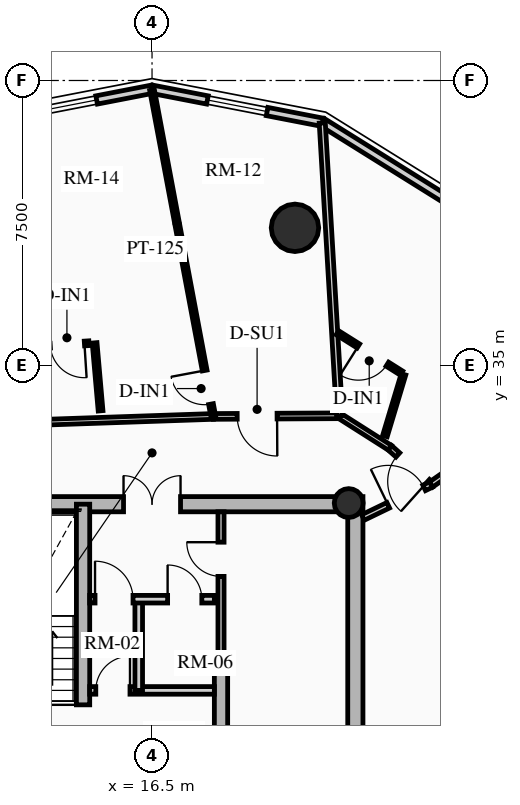
"""IFC4 building model, lengths in metres.
Left out: names, types, materials, properties, quantities, classifications, styles, units other than length and angle.
Written with IfcOpenShell. Run it as: python <this file> out.ifc"""

import sys

from ifc_helpers import new_model, si_unit, direction, frame, frame_2d, origin, origin_2d, place, context, subcontext, project, spatial, rectangle, circle, hollow_circle, extrude, source, transform, mapped, element, fill, save


model = new_model("IFC4")
c1 = context("Model", 3, precision=1e-05, world=origin(), true_north=direction((0.0, 1.0)))
c2 = subcontext(c1, "Body", "Model", "MODEL_VIEW")
j1 = project(units=[si_unit("LENGTHUNIT", "METRE"), si_unit("PLANEANGLEUNIT", "RADIAN")], contexts=[c1])
p1 = place(None, origin())
s1 = spatial("IfcSite", under=j1, at=p1, CompositionType="ELEMENT")
p2 = place(p1, origin())
s2 = spatial("IfcBuilding", under=s1, at=p2, CompositionType="ELEMENT")
p3 = place(p2, frame((0.0, 0.0, 157.42)))
s3 = spatial("IfcBuildingStorey", under=s2, at=p3, CompositionType="ELEMENT", Elevation=157.42)
p4 = place(p3, frame((21.85, 17.45, 0.0), z_axis=(0.0, 0.0, 1.0), x_axis=(0.0, 1.0, 0.0)))
e1 = element("IfcWall", 1, at=p4, inside=s3, PredefinedType="SHEAR", context=c2, shape_type="SweptSolid", body=[
    extrude(rectangle(XDim=14.1, YDim=0.4, at=frame_2d((7.05, 0.0))), origin(), (0.0, 0.0, 1.0), 2.91),
])
p5 = place(p3, frame((11.15, 31.35, 0.0), z_axis=(0.0, 0.0, 1.0), x_axis=(1.0, 0.0, 0.0)))
e2 = element("IfcWall", 2, at=p5, inside=s3, PredefinedType="SHEAR", context=c2, shape_type="SweptSolid", body=[
    extrude(rectangle(XDim=10.7, YDim=0.4, at=frame_2d((5.35, 0.0))), origin(), (0.0, 0.0, 1.0), 2.91),
])
m1 = source(origin(), c2, "Body", "SweptSolid", [
    extrude(rectangle(XDim=1.5, YDim=2.02, at=frame_2d((0.75, 1.01))), frame((0.0, 0.21, 0.0), z_axis=(0.0, -1.0, 0.0), x_axis=(1.0, 0.0, 0.0)), (0.0, 0.0, 1.0), 0.42),
])
p6 = place(p5, frame((4.6, 0.0, 0.0)))
e3 = element("IfcOpeningElement", 3, at=p6, cuts=e2, PredefinedType="OPENING", context=c2, shape_type="MappedRepresentation", body=[
    mapped(m1, transform((0.0, 0.0, 0.0), x_axis=(1.0, 0.0, 0.0), y_axis=(0.0, 1.0, 0.0), z_axis=(0.0, 0.0, 1.0), scale=1.0)),
])
p7 = place(p3, frame((14.685, 17.65, 0.0), z_axis=(0.0, 0.0, 1.0), x_axis=(0.0, 1.0, 0.0)))
e4 = element("IfcWall", 4, at=p7, inside=s3, PredefinedType="SHEAR", context=c2, shape_type="SweptSolid", body=[
    extrude(rectangle(XDim=13.7, YDim=0.35, at=frame_2d((6.85, 0.0))), origin(), (0.0, 0.0, 1.0), 2.91),
])
m2 = source(origin(), c2, "Body", "SweptSolid", [
    extrude(rectangle(XDim=1.1, YDim=2.015, at=frame_2d((0.55, 1.007))), frame((0.0, 0.185, 0.0), z_axis=(0.0, -1.0, 0.0), x_axis=(1.0, 0.0, 0.0)), (0.0, 0.0, 1.0), 0.37),
])
p8 = place(p7, frame((4.85, 0.0, 0.0)))
e5 = element("IfcOpeningElement", 5, at=p8, cuts=e4, PredefinedType="OPENING", context=c2, shape_type="MappedRepresentation", body=[
    mapped(m2, transform((0.0, 0.0, 0.0), x_axis=(1.0, 0.0, 0.0), y_axis=(0.0, 1.0, 0.0), z_axis=(0.0, 0.0, 1.0), scale=1.0)),
])
p9 = place(p7, frame((0.625, 0.0, 0.0)))
e6 = element("IfcOpeningElement", 6, at=p9, cuts=e4, PredefinedType="OPENING", context=c2, shape_type="MappedRepresentation", body=[
    mapped(m2, transform((0.0, 0.0, 0.0), x_axis=(1.0, 0.0, 0.0), y_axis=(0.0, 1.0, 0.0), z_axis=(0.0, 0.0, 1.0), scale=1.0)),
])
p10 = place(p7, frame((2.625, 0.0, 0.0)))
e7 = element("IfcOpeningElement", 7, at=p10, cuts=e4, PredefinedType="OPENING", context=c2, shape_type="MappedRepresentation", body=[
    mapped(m2, transform((0.0, 0.0, 0.0), x_axis=(1.0, 0.0, 0.0), y_axis=(0.0, 1.0, 0.0), z_axis=(0.0, 0.0, 1.0), scale=1.0)),
])
m3 = source(origin(), c2, "Body", "SweptSolid", [
    extrude(rectangle(XDim=1.15, YDim=2.02, at=frame_2d((0.575, 1.01))), frame((0.0, 0.185, 0.0), z_axis=(0.0, -1.0, 0.0), x_axis=(1.0, 0.0, 0.0)), (0.0, 0.0, 1.0), 0.37),
])
p11 = place(p7, frame((7.27, 0.0, 0.0)))
e8 = element("IfcOpeningElement", 8, at=p11, cuts=e4, PredefinedType="OPENING", context=c2, shape_type="MappedRepresentation", body=[
    mapped(m3, transform((0.0, 0.0, 0.0), x_axis=(1.0, 0.0, 0.0), y_axis=(0.0, 1.0, 0.0), z_axis=(0.0, 0.0, 1.0), scale=1.0)),
])
p12 = place(p3, frame((18.315, 17.65, 0.0), z_axis=(0.0, 0.0, 1.0), x_axis=(0.0, 1.0, 0.0)))
e9 = element("IfcWall", 9, at=p12, inside=s3, PredefinedType="SHEAR", context=c2, shape_type="SweptSolid", body=[
    extrude(rectangle(XDim=9.6, YDim=0.35, at=frame_2d((4.8, 0.0))), origin(), (0.0, 0.0, 1.0), 2.91),
])
p13 = place(p12, frame((5.28, 0.0, 0.0)))
e10 = element("IfcOpeningElement", 10, at=p13, cuts=e9, PredefinedType="OPENING", context=c2, shape_type="MappedRepresentation", body=[
    mapped(m3, transform((0.0, 0.0, 0.0), x_axis=(1.0, 0.0, 0.0), y_axis=(0.0, 1.0, 0.0), z_axis=(0.0, 0.0, 1.0), scale=1.0)),
])
p14 = place(p3, frame((21.675, 31.38, 0.0), z_axis=(0.0, 0.0, 1.0), x_axis=(1.0, 0.0, 0.0)))
e11 = element("IfcColumn", 11, at=p14, inside=s3, PredefinedType="COLUMN", context=c2, shape_type="SweptSolid", body=[
    extrude(hollow_circle(Radius=0.38, WallThickness=0.032, at=origin_2d()), origin(), (0.0, 0.0, 1.0), 2.91),
])
p15 = place(p3, frame((20.261, 38.623, 0.0), z_axis=(0.0, 0.0, 1.0), x_axis=(1.0, 0.0, 0.0)))
e12 = element("IfcColumn", 12, at=p15, inside=s3, PredefinedType="USERDEFINED", context=c2, shape_type="SweptSolid", body=[
    extrude(circle(Radius=0.625, at=origin_2d()), origin(), (0.0, 0.0, 1.0), 2.91),
])
p16 = place(p3, frame((20.985, 41.4, 0.0), z_axis=(0.0, 0.0, 1.0), x_axis=(0.848452391194, -0.529271707044, 0.0)))
e13 = element("IfcWall", 13, at=p16, inside=s3, PredefinedType="SOLIDWALL", context=c2, shape_type="SweptSolid", body=[
    extrude(rectangle(XDim=4.769, YDim=0.22, at=frame_2d((2.385, 0.0))), origin(), (0.0, 0.0, 1.0), 2.245),
])
p17 = place(p3, frame((16.5, 42.27, 0.0), z_axis=(0.0, 0.0, 1.0), x_axis=(0.981718699963, -0.190337579429, 0.0)))
e14 = element("IfcWall", 14, at=p17, inside=s3, PredefinedType="SOLIDWALL", context=c2, shape_type="SweptSolid", body=[
    extrude(rectangle(XDim=4.569, YDim=0.22, at=frame_2d((2.284, 0.0))), origin(), (0.0, 0.0, 1.0), 2.245),
])
m4 = source(origin(), c2, "Body", "SweptSolid", [
    extrude(rectangle(XDim=1.6, YDim=1.3, at=frame_2d((0.8, 0.65))), frame((0.0, 0.12, 0.0), z_axis=(0.0, -1.0, 0.0), x_axis=(1.0, 0.0, 0.0)), (0.0, 0.0, 1.0), 0.24),
])
p18 = place(p17, frame((1.484, 0.0, 0.65)))
e15 = element("IfcOpeningElement", 15, at=p18, cuts=e14, PredefinedType="OPENING", context=c2, shape_type="MappedRepresentation", body=[
    mapped(m4, transform((0.0, 0.0, 0.0), x_axis=(1.0, 0.0, 0.0), y_axis=(0.0, 1.0, 0.0), z_axis=(0.0, 0.0, 1.0), scale=1.0)),
])
p19 = place(p3, frame((12.015, 41.4, 0.0), z_axis=(0.0, 0.0, 1.0), x_axis=(0.981718699963, 0.190337579429, 0.0)))
e16 = element("IfcWall", 16, at=p19, inside=s3, PredefinedType="SOLIDWALL", context=c2, shape_type="SweptSolid", body=[
    extrude(rectangle(XDim=4.569, YDim=0.22, at=frame_2d((2.284, 0.0))), origin(), (0.0, 0.0, 1.0), 2.245),
])
p20 = place(p19, frame((1.484, 0.0, 0.65)))
e17 = element("IfcOpeningElement", 17, at=p20, cuts=e16, PredefinedType="OPENING", context=c2, shape_type="MappedRepresentation", body=[
    mapped(m4, transform((0.0, 0.0, 0.0), x_axis=(1.0, 0.0, 0.0), y_axis=(0.0, 1.0, 0.0), z_axis=(0.0, 0.0, 1.0), scale=1.0)),
])
p21 = place(p3, frame((14.86, 26.45, 0.0), z_axis=(0.0, 0.0, 1.0), x_axis=(1.0, 0.0, 0.0)))
e18 = element("IfcWall", 18, at=p21, inside=s3, PredefinedType="PARTITIONING", context=c2, shape_type="SweptSolid", body=[
    extrude(rectangle(XDim=3.28, YDim=0.2, at=frame_2d((1.64, 0.0))), origin(), (0.0, 0.0, 1.0), 2.675),
])
m5 = source(origin(), c2, "Body", "SweptSolid", [
    extrude(rectangle(XDim=0.9, YDim=2.005, at=frame_2d((0.45, 1.002))), frame((0.0, 0.11, 0.0), z_axis=(0.0, -1.0, 0.0), x_axis=(1.0, 0.0, 0.0)), (0.0, 0.0, 1.0), 0.22),
])
p22 = place(p21, frame((0.16, 0.0, 0.0)))
e19 = element("IfcOpeningElement", 19, at=p22, cuts=e18, PredefinedType="OPENING", context=c2, shape_type="MappedRepresentation", body=[
    mapped(m5, transform((0.0, 0.0, 0.0), x_axis=(1.0, 0.0, 0.0), y_axis=(0.0, 1.0, 0.0), z_axis=(0.0, 0.0, 1.0), scale=1.0)),
])
p23 = place(p3, frame((16.15, 26.45, 0.0), z_axis=(0.0, 0.0, 1.0), x_axis=(0.0, 1.0, 0.0)))
e20 = element("IfcWall", 20, at=p23, inside=s3, PredefinedType="PARTITIONING", context=c2, shape_type="SweptSolid", body=[
    extrude(rectangle(XDim=2.4, YDim=0.2, at=frame_2d((1.2, 0.0))), origin(), (0.0, 0.0, 1.0), 2.675),
])
p24 = place(p3, frame((14.86, 28.85, 0.0), z_axis=(0.0, 0.0, 1.0), x_axis=(1.0, 0.0, 0.0)))
e21 = element("IfcWall", 21, at=p24, inside=s3, PredefinedType="PARTITIONING", context=c2, shape_type="SweptSolid", body=[
    extrude(rectangle(XDim=3.28, YDim=0.2, at=frame_2d((1.64, 0.0))), origin(), (0.0, 0.0, 1.0), 2.675),
])
m6 = source(origin(), c2, "Body", "SweptSolid", [
    extrude(rectangle(XDim=1.0, YDim=2.015, at=frame_2d((0.5, 1.007))), frame((0.0, 0.11, 0.0), z_axis=(0.0, -1.0, 0.0), x_axis=(1.0, 0.0, 0.0)), (0.0, 0.0, 1.0), 0.22),
])
p25 = place(p24, frame((0.14, 0.0, 0.0)))
e22 = element("IfcOpeningElement", 22, at=p25, cuts=e21, PredefinedType="OPENING", context=c2, shape_type="MappedRepresentation", body=[
    mapped(m6, transform((0.0, 0.0, 0.0), x_axis=(1.0, 0.0, 0.0), y_axis=(0.0, 1.0, 0.0), z_axis=(0.0, 0.0, 1.0), scale=1.0)),
])
p26 = place(p24, frame((2.05, 0.0, 0.0)))
e23 = element("IfcOpeningElement", 23, at=p26, cuts=e21, PredefinedType="OPENING", context=c2, shape_type="MappedRepresentation", body=[
    mapped(m5, transform((0.0, 0.0, 0.0), x_axis=(1.0, 0.0, 0.0), y_axis=(0.0, 1.0, 0.0), z_axis=(0.0, 0.0, 1.0), scale=1.0)),
])
p27 = place(p3, frame((18.315, 27.25, 0.0), z_axis=(0.0, 0.0, 1.0), x_axis=(0.0, 1.0, 0.0)))
e24 = element("IfcWall", 24, at=p27, inside=s3, PredefinedType="PARTITIONING", context=c2, shape_type="SweptSolid", body=[
    extrude(rectangle(XDim=3.9, YDim=0.16, at=frame_2d((1.95, 0.0))), origin(), (0.0, 0.0, 1.0), 2.675),
])
m7 = source(origin(), c2, "Body", "SweptSolid", [
    extrude(rectangle(XDim=0.9, YDim=2.005, at=frame_2d((0.45, 1.002))), frame((0.0, 0.09, 0.0), z_axis=(0.0, -1.0, 0.0), x_axis=(1.0, 0.0, 0.0)), (0.0, 0.0, 1.0), 0.18),
])
p28 = place(p27, frame((2.2, 0.0, 0.0)))
e25 = element("IfcOpeningElement", 25, at=p28, cuts=e24, PredefinedType="OPENING", context=c2, shape_type="MappedRepresentation", body=[
    mapped(m7, transform((0.0, 0.0, 0.0), x_axis=(1.0, 0.0, 0.0), y_axis=(0.0, 1.0, 0.0), z_axis=(0.0, 0.0, 1.0), scale=1.0)),
])
p29 = place(p3, frame((23.841, 31.866, 0.0), z_axis=(0.0, 0.0, 1.0), x_axis=(-0.74511843306, 0.666932171, 0.0)))
e26 = element("IfcWall", 26, at=p29, inside=s3, PredefinedType="PARTITIONING", context=c2, shape_type="SweptSolid", body=[
    extrude(rectangle(XDim=1.455, YDim=0.15, at=frame_2d((0.728, 0.0))), origin(), (0.0, 0.0, 1.0), 2.245),
])
m8 = source(origin(), c2, "Body", "SweptSolid", [
    extrude(rectangle(XDim=1.05, YDim=2.015, at=frame_2d((0.525, 1.007))), frame((0.0, 0.085, 0.0), z_axis=(0.0, -1.0, 0.0), x_axis=(1.0, 0.0, 0.0)), (0.0, 0.0, 1.0), 0.17),
])
p30 = place(p29, frame((0.12, 0.0, 0.0)))
e27 = element("IfcOpeningElement", 27, at=p30, cuts=e26, PredefinedType="OPENING", context=c2, shape_type="MappedRepresentation", body=[
    mapped(m8, transform((0.0, 0.0, 0.0), x_axis=(1.0, 0.0, 0.0), y_axis=(0.0, 1.0, 0.0), z_axis=(0.0, 0.0, 1.0), scale=1.0)),
])
p31 = place(p3, frame((22.756, 32.836, 0.0), z_axis=(0.0, 0.0, 1.0), x_axis=(-0.843828401801, 0.536613108593, 0.0)))
e28 = element("IfcWall", 28, at=p31, inside=s3, PredefinedType="PARTITIONING", context=c2, shape_type="SweptSolid", body=[
    extrude(rectangle(XDim=1.565, YDim=0.15, at=frame_2d((0.783, 0.0))), origin(), (0.0, 0.0, 1.0), 2.245),
])
p32 = place(p3, frame((21.435, 33.677, 0.0), z_axis=(0.0, 0.0, 1.0), x_axis=(-0.999986775557, -0.005142831114, 0.0)))
e29 = element("IfcWall", 29, at=p32, inside=s3, PredefinedType="PARTITIONING", context=c2, shape_type="SweptSolid", body=[
    extrude(rectangle(XDim=3.323, YDim=0.15, at=frame_2d((1.662, 0.0))), origin(), (0.0, 0.0, 1.0), 2.245),
])
p33 = place(p32, frame((1.645, 0.0, 0.0)))
e30 = element("IfcOpeningElement", 30, at=p33, cuts=e29, PredefinedType="OPENING", context=c2, shape_type="MappedRepresentation", body=[
    mapped(m8, transform((0.0, 0.0, 0.0), x_axis=(1.0, 0.0, 0.0), y_axis=(0.0, 1.0, 0.0), z_axis=(0.0, 0.0, 1.0), scale=1.0)),
])
p34 = place(p3, frame((18.112, 33.659, 0.0), z_axis=(0.0, 0.0, 1.0), x_axis=(-0.999413895918, -0.034232508622, 0.0)))
e31 = element("IfcWall", 31, at=p34, inside=s3, PredefinedType="PARTITIONING", context=c2, shape_type="SweptSolid", body=[
    extrude(rectangle(XDim=6.404, YDim=0.15, at=frame_2d((3.202, 0.0))), origin(), (0.0, 0.0, 1.0), 2.245),
])
p35 = place(p3, frame((23.841, 31.866, 0.0), z_axis=(0.0, 0.0, 1.0), x_axis=(0.819514693563, 0.573058170724, 0.0)))
e32 = element("IfcWall", 32, at=p35, inside=s3, PredefinedType="PARTITIONING", context=c2, shape_type="SweptSolid", body=[
    extrude(rectangle(XDim=5.352, YDim=0.16, at=frame_2d((2.676, 0.0))), origin(), (0.0, 0.0, 1.0), 2.245),
])
p36 = place(p3, frame((21.435, 33.677, 0.0), z_axis=(0.0, 0.0, 1.0), x_axis=(-0.059087305226, 0.99825281886, 0.0)))
e33 = element("IfcWall", 33, at=p36, inside=s3, PredefinedType="PARTITIONING", context=c2, shape_type="SweptSolid", body=[
    extrude(rectangle(XDim=7.718, YDim=0.16, at=frame_2d((3.859, 0.0))), origin(), (0.0, 0.0, 1.0), 2.245),
])
p37 = place(p3, frame((22.05, 31.0, 0.0), z_axis=(0.0, 0.0, 1.0), x_axis=(0.900241516545, 0.435390872537, 0.0)))
e34 = element("IfcWall", 34, at=p37, inside=s3, PredefinedType="PARTITIONING", context=c2, shape_type="SweptSolid", body=[
    extrude(rectangle(XDim=1.989, YDim=0.16, at=frame_2d((0.995, 0.0))), origin(), (0.0, 0.0, 1.0), 2.245),
])
m9 = source(origin(), c2, "Body", "SweptSolid", [
    extrude(rectangle(XDim=1.05, YDim=2.015, at=frame_2d((0.525, 1.007))), frame((0.0, 0.09, 0.0), z_axis=(0.0, -1.0, 0.0), x_axis=(1.0, 0.0, 0.0)), (0.0, 0.0, 1.0), 0.18),
])
p38 = place(p37, frame((0.739, 0.0, 0.0)))
e35 = element("IfcOpeningElement", 35, at=p38, cuts=e34, PredefinedType="OPENING", context=c2, shape_type="MappedRepresentation", body=[
    mapped(m9, transform((0.0, 0.0, 0.0), x_axis=(1.0, 0.0, 0.0), y_axis=(0.0, 1.0, 0.0), z_axis=(0.0, 0.0, 1.0), scale=1.0)),
])
p39 = place(p3, frame((22.628, 33.142, 0.0), z_axis=(0.0, 0.0, 1.0), x_axis=(0.28808673097, 0.957604320917, 0.0)))
e36 = element("IfcWall", 36, at=p39, inside=s3, PredefinedType="PARTITIONING", context=c2, shape_type="SweptSolid", body=[
    extrude(rectangle(XDim=1.698, YDim=0.125, at=frame_2d((0.849, 0.0))), origin(), (0.0, 0.0, 1.0), 2.245),
])
p40 = place(p3, frame((23.064, 34.801, 0.0), z_axis=(0.0, 0.0, 1.0), x_axis=(-0.846418905871, 0.532517638942, 0.0)))
e37 = element("IfcWall", 37, at=p40, inside=s3, PredefinedType="PARTITIONING", context=c2, shape_type="SweptSolid", body=[
    extrude(rectangle(XDim=1.993, YDim=0.125, at=frame_2d((0.997, 0.0))), origin(), (0.0, 0.0, 1.0), 2.675),
])
m10 = source(origin(), c2, "Body", "SweptSolid", [
    extrude(rectangle(XDim=0.9, YDim=2.005, at=frame_2d((0.45, 1.002))), frame((0.0, 0.073, 0.0), z_axis=(0.0, -1.0, 0.0), x_axis=(1.0, 0.0, 0.0)), (0.0, 0.0, 1.0), 0.145),
])
p41 = place(p40, frame((0.44, 0.0, 0.0)))
e38 = element("IfcOpeningElement", 38, at=p41, cuts=e37, PredefinedType="OPENING", context=c2, shape_type="MappedRepresentation", body=[
    mapped(m10, transform((0.0, 0.0, 0.0), x_axis=(1.0, 0.0, 0.0), y_axis=(0.0, 1.0, 0.0), z_axis=(0.0, 0.0, 1.0), scale=1.0)),
])
p42 = place(p3, frame((18.112, 33.659, 0.0), z_axis=(0.0, 0.0, 1.0), x_axis=(-0.18446223694, 0.982839601941, 0.0)))
e39 = element("IfcWall", 39, at=p42, inside=s3, PredefinedType="PARTITIONING", context=c2, shape_type="SweptSolid", body=[
    extrude(rectangle(XDim=8.74, YDim=0.125, at=frame_2d((4.37, 0.0))), origin(), (0.0, 0.0, 1.0), 2.245),
])
p43 = place(p42, frame((0.33, 0.0, 0.0)))
e40 = element("IfcOpeningElement", 40, at=p43, cuts=e39, PredefinedType="OPENING", context=c2, shape_type="MappedRepresentation", body=[
    mapped(m10, transform((0.0, 0.0, 0.0), x_axis=(1.0, 0.0, 0.0), y_axis=(0.0, 1.0, 0.0), z_axis=(0.0, 0.0, 1.0), scale=1.0)),
])
p44 = place(p3, frame((15.146, 33.807, 0.0), z_axis=(0.0, 0.0, 1.0), x_axis=(-0.087433462003, 0.996170361797, 0.0)))
e41 = element("IfcWall", 41, at=p44, inside=s3, PredefinedType="PARTITIONING", context=c2, shape_type="SweptSolid", body=[
    extrude(rectangle(XDim=1.795, YDim=0.125, at=frame_2d((0.898, 0.0))), origin(), (0.0, 0.0, 1.0), 2.675),
])
p45 = place(p3, frame((14.841, 35.586, 0.0), z_axis=(0.0, 0.0, 1.0), x_axis=(-0.997963636416, -0.063785424599, 0.0)))
e42 = element("IfcWall", 42, at=p45, inside=s3, PredefinedType="PARTITIONING", context=c2, shape_type="SweptSolid", body=[
    extrude(rectangle(XDim=2.852, YDim=0.125, at=frame_2d((1.426, 0.0))), origin(), (0.0, 0.0, 1.0), 2.245),
])
p46 = place(p45, frame((0.12, 0.0, 0.0)))
e43 = element("IfcOpeningElement", 43, at=p46, cuts=e42, PredefinedType="OPENING", context=c2, shape_type="MappedRepresentation", body=[
    mapped(m10, transform((0.0, 0.0, 0.0), x_axis=(1.0, 0.0, 0.0), y_axis=(0.0, 1.0, 0.0), z_axis=(0.0, 0.0, 1.0), scale=1.0)),
])
m11 = source(origin(), c2, "Body", "SweptSolid", [
    extrude(rectangle(XDim=1.6, YDim=1.3, at=frame_2d((0.8, 0.65))), frame((0.0, 0.03, 0.0), z_axis=(0.0, -1.0, 0.0), x_axis=(1.0, 0.0, 0.0)), (0.0, 0.0, 1.0), 0.06),
])
p47 = place(p18, origin())
e44 = element("IfcWindow", 44, at=p47, inside=s3, PartitioningType="SINGLE_PANEL", PredefinedType="WINDOW", context=c2, shape_type="MappedRepresentation", body=[
    mapped(m11, transform((0.0, 0.0, 0.0), x_axis=(1.0, 0.0, 0.0), y_axis=(0.0, 1.0, 0.0), z_axis=(0.0, 0.0, 1.0), scale=1.0)),
])
fill(e15, e44)
p48 = place(p20, origin())
e45 = element("IfcWindow", 45, at=p48, inside=s3, PartitioningType="SINGLE_PANEL", PredefinedType="WINDOW", context=c2, shape_type="MappedRepresentation", body=[
    mapped(m11, transform((0.0, 0.0, 0.0), x_axis=(1.0, 0.0, 0.0), y_axis=(0.0, 1.0, 0.0), z_axis=(0.0, 0.0, 1.0), scale=1.0)),
])
fill(e17, e45)
m12 = source(origin(), c2, "Body", "SweptSolid", [
    extrude(rectangle(XDim=1.15, YDim=2.02, at=frame_2d((0.575, 1.01))), frame((0.0, 0.025, 0.0), z_axis=(0.0, -1.0, 0.0), x_axis=(1.0, 0.0, 0.0)), (0.0, 0.0, 1.0), 0.05),
])
p49 = place(p11, origin())
e46 = element("IfcDoor", 46, at=p49, inside=s3, OperationType="SINGLE_SWING_RIGHT", PredefinedType="DOOR", context=c2, shape_type="MappedRepresentation", body=[
    mapped(m12, transform((0.0, 0.0, 0.0), x_axis=(1.0, 0.0, 0.0), y_axis=(0.0, 1.0, 0.0), z_axis=(0.0, 0.0, 1.0), scale=1.0)),
])
fill(e8, e46)
m13 = source(origin(), c2, "Body", "SweptSolid", [
    extrude(rectangle(XDim=1.5, YDim=2.02, at=frame_2d((0.75, 1.01))), frame((0.0, 0.025, 0.0), z_axis=(0.0, -1.0, 0.0), x_axis=(1.0, 0.0, 0.0)), (0.0, 0.0, 1.0), 0.05),
])
p50 = place(p6, origin())
e47 = element("IfcDoor", 47, at=p50, inside=s3, OperationType="DOUBLE_DOOR_SINGLE_SWING", PredefinedType="DOOR", context=c2, shape_type="MappedRepresentation", body=[
    mapped(m13, transform((0.0, 0.0, 0.0), x_axis=(1.0, 0.0, 0.0), y_axis=(0.0, 1.0, 0.0), z_axis=(0.0, 0.0, 1.0), scale=1.0)),
])
fill(e3, e47)
m14 = source(origin(), c2, "Body", "SweptSolid", [
    extrude(rectangle(XDim=0.9, YDim=2.005, at=frame_2d((0.45, 1.002))), frame((0.0, 0.025, 0.0), z_axis=(0.0, -1.0, 0.0), x_axis=(1.0, 0.0, 0.0)), (0.0, 0.0, 1.0), 0.05),
])
p51 = place(p22, origin())
e48 = element("IfcDoor", 48, at=p51, inside=s3, OperationType="SINGLE_SWING_RIGHT", PredefinedType="DOOR", context=c2, shape_type="MappedRepresentation", body=[
    mapped(m14, transform((0.0, 0.0, 0.0), x_axis=(1.0, 0.0, 0.0), y_axis=(0.0, 1.0, 0.0), z_axis=(0.0, 0.0, 1.0), scale=1.0)),
])
fill(e19, e48)
m15 = source(origin(), c2, "Body", "SweptSolid", [
    extrude(rectangle(XDim=1.0, YDim=2.015, at=frame_2d((0.5, 1.007))), frame((0.0, 0.025, 0.0), z_axis=(0.0, -1.0, 0.0), x_axis=(1.0, 0.0, 0.0)), (0.0, 0.0, 1.0), 0.05),
])
p52 = place(p25, origin())
e49 = element("IfcDoor", 49, at=p52, inside=s3, OperationType="SINGLE_SWING_LEFT", PredefinedType="DOOR", context=c2, shape_type="MappedRepresentation", body=[
    mapped(m15, transform((0.0, 0.0, 0.0), x_axis=(1.0, 0.0, 0.0), y_axis=(0.0, 1.0, 0.0), z_axis=(0.0, 0.0, 1.0), scale=1.0)),
])
fill(e22, e49)
p53 = place(p26, origin())
e50 = element("IfcDoor", 50, at=p53, inside=s3, OperationType="SINGLE_SWING_LEFT", PredefinedType="DOOR", context=c2, shape_type="MappedRepresentation", body=[
    mapped(m14, transform((0.0, 0.0, 0.0), x_axis=(1.0, 0.0, 0.0), y_axis=(0.0, 1.0, 0.0), z_axis=(0.0, 0.0, 1.0), scale=1.0)),
])
fill(e23, e50)
p54 = place(p28, origin())
e51 = element("IfcDoor", 51, at=p54, inside=s3, OperationType="SINGLE_SWING_RIGHT", PredefinedType="DOOR", context=c2, shape_type="MappedRepresentation", body=[
    mapped(m14, transform((0.0, 0.0, 0.0), x_axis=(1.0, 0.0, 0.0), y_axis=(0.0, 1.0, 0.0), z_axis=(0.0, 0.0, 1.0), scale=1.0)),
])
fill(e25, e51)
m16 = source(origin(), c2, "Body", "SweptSolid", [
    extrude(rectangle(XDim=1.05, YDim=2.015, at=frame_2d((0.525, 1.007))), frame((0.0, 0.025, 0.0), z_axis=(0.0, -1.0, 0.0), x_axis=(1.0, 0.0, 0.0)), (0.0, 0.0, 1.0), 0.05),
])
p55 = place(p38, origin())
e52 = element("IfcDoor", 52, at=p55, inside=s3, OperationType="SINGLE_SWING_LEFT", PredefinedType="DOOR", context=c2, shape_type="MappedRepresentation", body=[
    mapped(m16, transform((0.0, 0.0, 0.0), x_axis=(1.0, 0.0, 0.0), y_axis=(0.0, 1.0, 0.0), z_axis=(0.0, 0.0, 1.0), scale=1.0)),
])
fill(e35, e52)
p56 = place(p30, origin())
e53 = element("IfcDoor", 53, at=p56, inside=s3, OperationType="SINGLE_SWING_LEFT", PredefinedType="DOOR", context=c2, shape_type="MappedRepresentation", body=[
    mapped(m16, transform((0.0, 0.0, 0.0), x_axis=(1.0, 0.0, 0.0), y_axis=(0.0, 1.0, 0.0), z_axis=(0.0, 0.0, 1.0), scale=1.0)),
])
fill(e27, e53)
p57 = place(p41, origin())
e54 = element("IfcDoor", 54, at=p57, inside=s3, OperationType="SINGLE_SWING_RIGHT", PredefinedType="DOOR", context=c2, shape_type="MappedRepresentation", body=[
    mapped(m14, transform((0.0, 0.0, 0.0), x_axis=(1.0, 0.0, 0.0), y_axis=(0.0, 1.0, 0.0), z_axis=(0.0, 0.0, 1.0), scale=1.0)),
])
fill(e38, e54)
p58 = place(p33, origin())
e55 = element("IfcDoor", 55, at=p58, inside=s3, OperationType="SINGLE_SWING_LEFT", PredefinedType="DOOR", context=c2, shape_type="MappedRepresentation", body=[
    mapped(m16, transform((0.0, 0.0, 0.0), x_axis=(1.0, 0.0, 0.0), y_axis=(0.0, 1.0, 0.0), z_axis=(0.0, 0.0, 1.0), scale=1.0)),
])
fill(e30, e55)
p59 = place(p43, origin())
e56 = element("IfcDoor", 56, at=p59, inside=s3, OperationType="SINGLE_SWING_RIGHT", PredefinedType="DOOR", context=c2, shape_type="MappedRepresentation", body=[
    mapped(m14, transform((0.0, 0.0, 0.0), x_axis=(1.0, 0.0, 0.0), y_axis=(0.0, 1.0, 0.0), z_axis=(0.0, 0.0, 1.0), scale=1.0)),
])
fill(e40, e56)
p60 = place(p46, origin())
e57 = element("IfcDoor", 57, at=p60, inside=s3, OperationType="SINGLE_SWING_LEFT", PredefinedType="DOOR", context=c2, shape_type="MappedRepresentation", body=[
    mapped(m14, transform((0.0, 0.0, 0.0), x_axis=(1.0, 0.0, 0.0), y_axis=(0.0, 1.0, 0.0), z_axis=(0.0, 0.0, 1.0), scale=1.0)),
])
fill(e43, e57)
save(model, sys.argv[1])
